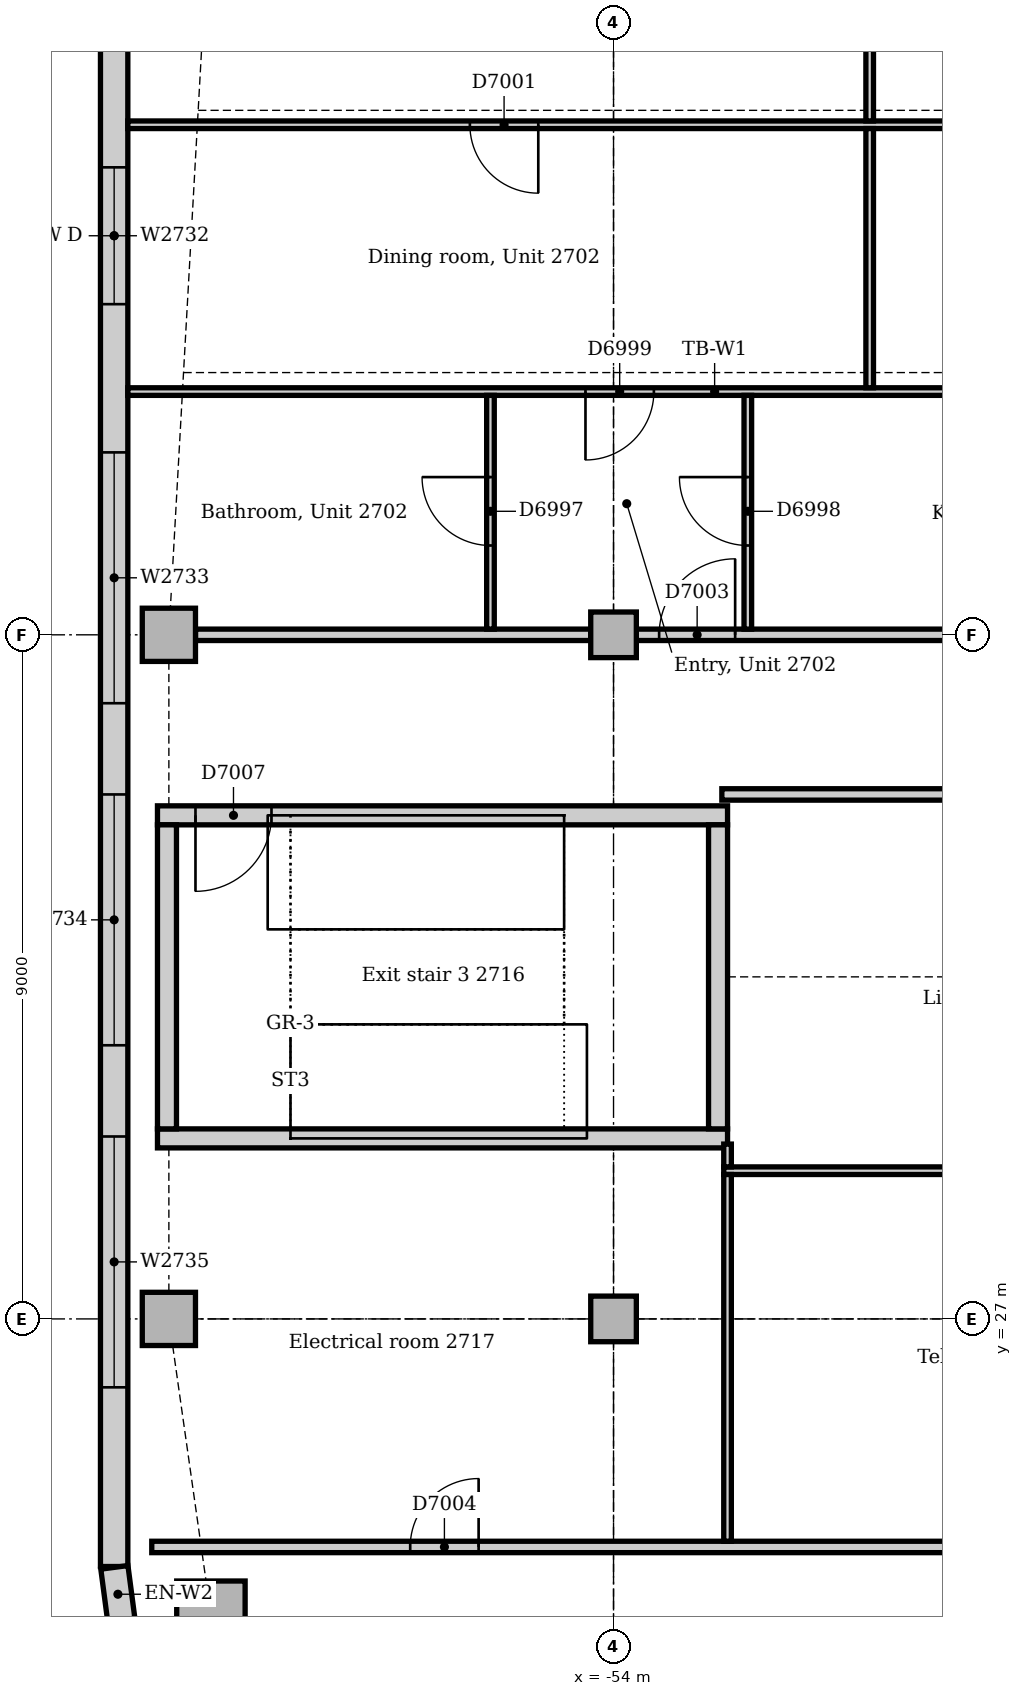
"""IFC4 building model, lengths in metres.
Left out: names, types, materials, properties, quantities, classifications, styles, units other than length and angle.
Written with IfcOpenShell. Run it as: python <this file> out.ifc"""

import sys

from ifc_helpers import new_model, si_unit, direction, frame, frame_2d, origin, origin_2d, place, context, subcontext, project, spatial, rectangle, extrude, element, fill, save


model = new_model("IFC4")
c1 = context("Model", 3, precision=1e-05, world=origin(), true_north=direction((0.0, 1.0)))
c2 = subcontext(c1, "Body", "Model", "MODEL_VIEW")
j1 = project(units=[si_unit("LENGTHUNIT", "METRE"), si_unit("PLANEANGLEUNIT", "RADIAN")], contexts=[c1])
p1 = place(None, origin())
s1 = spatial("IfcSite", under=j1, at=p1, CompositionType="ELEMENT")
p2 = place(p1, origin())
s2 = spatial("IfcBuilding", under=s1, at=p2, CompositionType="ELEMENT")
p3 = place(p2, frame((0.0, 0.0, 116.0)))
s3 = spatial("IfcBuildingStorey", under=s2, at=p3, CompositionType="ELEMENT", Elevation=116.0)
p4 = place(p3, frame((-60.0, 29.375, 0.0), z_axis=(0.0, 0.0, 1.0), x_axis=(1.0, 0.0, 0.0)))
e1 = element("IfcWall", 1, at=p4, inside=s3, PredefinedType="SOLIDWALL", context=c2, shape_type="SweptSolid", body=[
    extrude(rectangle(XDim=7.5, YDim=0.25, at=frame_2d((3.75, 0.0))), origin(), (0.0, 0.0, 1.0), 4.0),
])
p5 = place(p3, frame((-52.5, 33.625, 0.0), z_axis=(0.0, 0.0, 1.0), x_axis=(-1.0, 0.0, 0.0)))
e2 = element("IfcWall", 2, at=p5, inside=s3, PredefinedType="SOLIDWALL", context=c2, shape_type="SweptSolid", body=[
    extrude(rectangle(XDim=7.5, YDim=0.25, at=frame_2d((3.75, 0.0))), origin(), (0.0, 0.0, 1.0), 4.0),
])
p6 = place(p5, frame((6.0, 0.0, 0.0)))
e3 = element("IfcOpeningElement", 3, at=p6, cuts=e2, PredefinedType="OPENING", context=c2, shape_type="SweptSolid", body=[
    extrude(rectangle(XDim=1.0, YDim=2.1, at=frame_2d((0.5, 1.05))), frame((0.0, 0.135, 0.0), z_axis=(0.0, -1.0, 0.0), x_axis=(1.0, 0.0, 0.0)), (0.0, 0.0, 1.0), 0.27),
])
for number, where, z_axis, x_axis in (
    (4, (-52.625, 29.5, 0.0), (0.0, 0.0, 1.0), (0.0, 1.0, 0.0)),
    (5, (-59.875, 33.5, 0.0), (0.0, 0.0, 1.0), (0.0, -1.0, 0.0)),
):
    element("IfcWall", number, at=place(p3, frame(where, z_axis=z_axis, x_axis=x_axis)), inside=s3, PredefinedType="SOLIDWALL", context=c2, shape_type="SweptSolid", body=[
        extrude(rectangle(XDim=4.0, YDim=0.25, at=frame_2d((2.0, 0.0))), origin(), (0.0, 0.0, 1.0), 4.0),
    ])
p7 = place(p3, frame((-59.297, 23.102, 0.0), z_axis=(0.0, 0.0, 1.0), x_axis=(1.0, 0.0, 0.0)))
e6 = element("IfcColumn", 6, at=p7, inside=s3, PredefinedType="COLUMN", context=c2, shape_type="SweptSolid", body=[
    extrude(rectangle(XDim=0.9, YDim=0.9, at=origin_2d()), origin(), (0.0, 0.0, 1.0), 3.85),
])
for number, where, z_axis, x_axis in (
    (7, (-59.85, 27.0, 0.0), (0.0, 0.0, 1.0), (1.0, 0.0, 0.0)),
    (8, (-59.85, 36.0, 0.0), (0.0, 0.0, 1.0), (1.0, 0.0, 0.0)),
):
    element("IfcColumn", number, at=place(p3, frame(where, z_axis=z_axis, x_axis=x_axis)), inside=s3, PredefinedType="COLUMN", context=c2, shape_type="SweptSolid", body=[
        extrude(rectangle(XDim=0.7, YDim=0.7, at=origin_2d()), origin(), (0.0, 0.0, 1.0), 3.85),
    ])
for number, where, z_axis, x_axis in (
    (9, (-54.0, 27.0, 0.0), (0.0, 0.0, 1.0), (1.0, 0.0, 0.0)),
    (10, (-54.0, 36.0, 0.0), (0.0, 0.0, 1.0), (1.0, 0.0, 0.0)),
):
    element("IfcColumn", number, at=place(p3, frame(where, z_axis=z_axis, x_axis=x_axis)), inside=s3, PredefinedType="COLUMN", context=c2, shape_type="SweptSolid", body=[
        extrude(rectangle(XDim=0.6, YDim=0.6, at=origin_2d()), origin(), (0.0, 0.0, 1.0), 3.85),
    ])
p8 = place(p3, frame((-60.57, 45.257, 0.0), z_axis=(0.0, 0.0, 1.0), x_axis=(0.0, -1.0, 0.0)))
e11 = element("IfcWall", 11, at=p8, inside=s3, PredefinedType="STANDARD", context=c2, shape_type="SweptSolid", body=[
    extrude(rectangle(XDim=21.515, YDim=0.36, at=frame_2d((10.757, 0.0))), origin(), (0.0, 0.0, 1.0), 3.85),
])
p9 = place(p8, frame((3.107, 0.0, 0.9)))
e12 = element("IfcOpeningElement", 12, at=p9, cuts=e11, PredefinedType="OPENING", context=c2, shape_type="SweptSolid", body=[
    extrude(rectangle(XDim=1.8, YDim=1.6, at=frame_2d((0.9, 0.8))), frame((0.0, 0.19, 0.0), z_axis=(0.0, -1.0, 0.0), x_axis=(1.0, 0.0, 0.0)), (0.0, 0.0, 1.0), 0.38),
])
p10 = place(p8, frame((6.857, 0.0, 0.9)))
e13 = element("IfcOpeningElement", 13, at=p10, cuts=e11, PredefinedType="OPENING", context=c2, shape_type="SweptSolid", body=[
    extrude(rectangle(XDim=3.3, YDim=1.6, at=frame_2d((1.65, 0.8))), frame((0.0, 0.19, 0.0), z_axis=(0.0, -1.0, 0.0), x_axis=(1.0, 0.0, 0.0)), (0.0, 0.0, 1.0), 0.38),
])
p11 = place(p8, frame((11.357, 0.0, 0.9)))
e14 = element("IfcOpeningElement", 14, at=p11, cuts=e11, PredefinedType="OPENING", context=c2, shape_type="SweptSolid", body=[
    extrude(rectangle(XDim=3.3, YDim=1.6, at=frame_2d((1.65, 0.8))), frame((0.0, 0.19, 0.0), z_axis=(0.0, -1.0, 0.0), x_axis=(1.0, 0.0, 0.0)), (0.0, 0.0, 1.0), 0.38),
])
p12 = place(p8, frame((15.857, 0.0, 0.9)))
e15 = element("IfcOpeningElement", 15, at=p12, cuts=e11, PredefinedType="OPENING", context=c2, shape_type="SweptSolid", body=[
    extrude(rectangle(XDim=3.3, YDim=1.6, at=frame_2d((1.65, 0.8))), frame((0.0, 0.19, 0.0), z_axis=(0.0, -1.0, 0.0), x_axis=(1.0, 0.0, 0.0)), (0.0, 0.0, 1.0), 0.38),
])
p13 = place(p3, frame((-60.567, 23.731, 0.0), z_axis=(0.0, 0.0, 1.0), x_axis=(0.13055608231, -0.99144092581, 0.0)))
e16 = element("IfcWall", 16, at=p13, inside=s3, PredefinedType="STANDARD", context=c2, shape_type="SweptSolid", body=[
    extrude(rectangle(XDim=0.713, YDim=0.36, at=frame_2d((0.356, 0.0))), origin(), (0.0, 0.0, 1.0), 3.85),
])
p14 = place(p3, frame((-53.7, 36.0, 0.0), z_axis=(0.0, 0.0, 1.0), x_axis=(1.0, 0.0, 0.0)))
e17 = element("IfcWall", 17, at=p14, inside=s3, PredefinedType="PARTITIONING", context=c2, shape_type="SweptSolid", body=[
    extrude(rectangle(XDim=8.4, YDim=0.15, at=frame_2d((4.2, 0.0))), origin(), (0.0, 0.0, 1.0), 3.262),
])
p15 = place(p14, frame((0.3, 0.0, 0.0)))
e18 = element("IfcOpeningElement", 18, at=p15, cuts=e17, PredefinedType="OPENING", context=c2, shape_type="SweptSolid", body=[
    extrude(rectangle(XDim=1.0, YDim=2.1, at=frame_2d((0.5, 1.05))), frame((0.0, 0.085, 0.0), z_axis=(0.0, -1.0, 0.0), x_axis=(1.0, 0.0, 0.0)), (0.0, 0.0, 1.0), 0.17),
])
p16 = place(p3, frame((-59.5, 36.0, 0.0), z_axis=(0.0, 0.0, 1.0), x_axis=(1.0, 0.0, 0.0)))
e19 = element("IfcWall", 19, at=p16, inside=s3, PredefinedType="PARTITIONING", context=c2, shape_type="SweptSolid", body=[
    extrude(rectangle(XDim=5.2, YDim=0.15, at=frame_2d((2.6, 0.0))), origin(), (0.0, 0.0, 1.0), 3.35),
])
p17 = place(p3, frame((-60.075, 24.0, 0.0), z_axis=(0.0, 0.0, 1.0), x_axis=(1.0, 0.0, 0.0)))
e20 = element("IfcWall", 20, at=p17, inside=s3, PredefinedType="PARTITIONING", context=c2, shape_type="SweptSolid", body=[
    extrude(rectangle(XDim=15.15, YDim=0.15, at=frame_2d((7.575, 0.0))), origin(), (0.0, 0.0, 1.0), 3.85),
])
p18 = place(p17, frame((3.4, 0.0, 0.0)))
e21 = element("IfcOpeningElement", 21, at=p18, cuts=e20, PredefinedType="OPENING", context=c2, shape_type="SweptSolid", body=[
    extrude(rectangle(XDim=0.9, YDim=2.1, at=frame_2d((0.45, 1.05))), frame((0.0, 0.085, 0.0), z_axis=(0.0, -1.0, 0.0), x_axis=(1.0, 0.0, 0.0)), (0.0, 0.0, 1.0), 0.17),
])
p19 = place(p3, frame((-52.575, 33.9, 0.0), z_axis=(0.0, 0.0, 1.0), x_axis=(1.0, 0.0, 0.0)))
e22 = element("IfcWall", 22, at=p19, inside=s3, PredefinedType="PARTITIONING", context=c2, shape_type="SweptSolid", body=[
    extrude(rectangle(XDim=7.5, YDim=0.15, at=frame_2d((3.75, 0.0))), origin(), (0.0, 0.0, 1.0), 3.85),
])
p20 = place(p19, frame((3.3, 0.0, 0.0)))
e23 = element("IfcOpeningElement", 23, at=p20, cuts=e22, PredefinedType="OPENING", context=c2, shape_type="SweptSolid", body=[
    extrude(rectangle(XDim=0.9, YDim=2.1, at=frame_2d((0.45, 1.05))), frame((0.0, 0.085, 0.0), z_axis=(0.0, -1.0, 0.0), x_axis=(1.0, 0.0, 0.0)), (0.0, 0.0, 1.0), 0.17),
])
p21 = place(p3, frame((-60.39, 39.2, 0.0), z_axis=(0.0, 0.0, 1.0), x_axis=(1.0, 0.0, 0.0)))
e24 = element("IfcWall", 24, at=p21, inside=s3, PredefinedType="PARTITIONING", context=c2, shape_type="SweptSolid", body=[
    extrude(rectangle(XDim=15.44, YDim=0.1, at=frame_2d((7.72, 0.0))), origin(), (0.0, 0.0, 1.0), 3.85),
])
p22 = place(p21, frame((6.021, 0.0, 0.0)))
e25 = element("IfcOpeningElement", 25, at=p22, cuts=e24, PredefinedType="OPENING", context=c2, shape_type="SweptSolid", body=[
    extrude(rectangle(XDim=0.9, YDim=2.1, at=frame_2d((0.45, 1.05))), frame((0.0, 0.06, 0.0), z_axis=(0.0, -1.0, 0.0), x_axis=(1.0, 0.0, 0.0)), (0.0, 0.0, 1.0), 0.12),
])
p23 = place(p3, frame((-60.39, 42.71, 0.0), z_axis=(0.0, 0.0, 1.0), x_axis=(1.0, 0.0, 0.0)))
e26 = element("IfcWall", 26, at=p23, inside=s3, PredefinedType="PARTITIONING", context=c2, shape_type="SweptSolid", body=[
    extrude(rectangle(XDim=15.44, YDim=0.1, at=frame_2d((7.72, 0.0))), origin(), (0.0, 0.0, 1.0), 3.85),
])
p24 = place(p23, frame((4.5, 0.0, 0.0)))
e27 = element("IfcOpeningElement", 27, at=p24, cuts=e26, PredefinedType="OPENING", context=c2, shape_type="SweptSolid", body=[
    extrude(rectangle(XDim=0.9, YDim=2.1, at=frame_2d((0.45, 1.05))), frame((0.0, 0.06, 0.0), z_axis=(0.0, -1.0, 0.0), x_axis=(1.0, 0.0, 0.0)), (0.0, 0.0, 1.0), 0.12),
])
p25 = place(p23, frame((12.06, 0.0, 0.0)))
e28 = element("IfcOpeningElement", 28, at=p25, cuts=e26, PredefinedType="OPENING", context=c2, shape_type="SweptSolid", body=[
    extrude(rectangle(XDim=0.9, YDim=2.1, at=frame_2d((0.45, 1.05))), frame((0.0, 0.06, 0.0), z_axis=(0.0, -1.0, 0.0), x_axis=(1.0, 0.0, 0.0)), (0.0, 0.0, 1.0), 0.12),
])
p26 = place(p3, frame((-50.63, 39.25, 0.0), z_axis=(0.0, 0.0, 1.0), x_axis=(0.0, 1.0, 0.0)))
e29 = element("IfcWall", 29, at=p26, inside=s3, PredefinedType="PARTITIONING", context=c2, shape_type="SweptSolid", body=[
    extrude(rectangle(XDim=3.41, YDim=0.1, at=frame_2d((1.705, 0.0))), origin(), (0.0, 0.0, 1.0), 3.85),
])
p27 = place(p3, frame((-50.63, 42.76, 0.0), z_axis=(0.0, 0.0, 1.0), x_axis=(0.0, 1.0, 0.0)))
e30 = element("IfcWall", 30, at=p27, inside=s3, PredefinedType="PARTITIONING", context=c2, shape_type="SweptSolid", body=[
    extrude(rectangle(XDim=6.38, YDim=0.1, at=frame_2d((3.19, 0.0))), origin(), (0.0, 0.0, 1.0), 3.85),
])
p28 = place(p27, frame((2.75, 0.0, 0.0)))
e31 = element("IfcOpeningElement", 31, at=p28, cuts=e30, PredefinedType="OPENING", context=c2, shape_type="SweptSolid", body=[
    extrude(rectangle(XDim=0.9, YDim=2.1, at=frame_2d((0.45, 1.05))), frame((0.0, 0.06, 0.0), z_axis=(0.0, -1.0, 0.0), x_axis=(1.0, 0.0, 0.0)), (0.0, 0.0, 1.0), 0.12),
])
p29 = place(p3, frame((-52.55, 28.95, 0.0), z_axis=(0.0, 0.0, 1.0), x_axis=(1.0, 0.0, 0.0)))
e32 = element("IfcWall", 32, at=p29, inside=s3, PredefinedType="PARTITIONING", context=c2, shape_type="SweptSolid", body=[
    extrude(rectangle(XDim=7.475, YDim=0.1, at=frame_2d((3.737, 0.0))), origin(), (0.0, 0.0, 1.0), 3.85),
])
p30 = place(p3, frame((-52.5, 29.0, 0.0), z_axis=(0.0, 0.0, 1.0), x_axis=(0.0, 1.0, 0.0)))
e33 = element("IfcWall", 33, at=p30, inside=s3, PredefinedType="PARTITIONING", context=c2, shape_type="SweptSolid", body=[
    extrude(rectangle(XDim=0.3, YDim=0.1, at=frame_2d((0.15, 0.0))), origin(), (0.0, 0.0, 1.0), 3.85),
])
p31 = place(p3, frame((-52.5, 24.075, 0.0), z_axis=(0.0, 0.0, 1.0), x_axis=(0.0, 1.0, 0.0)))
e34 = element("IfcWall", 34, at=p31, inside=s3, PredefinedType="PARTITIONING", context=c2, shape_type="SweptSolid", body=[
    extrude(rectangle(XDim=4.825, YDim=0.1, at=frame_2d((2.413, 0.0))), origin(), (0.0, 0.0, 1.0), 3.85),
])
p32 = place(p3, frame((-55.619, 36.075, 0.0), z_axis=(0.0, 0.0, 1.0), x_axis=(0.0, 1.0, 0.0)))
e35 = element("IfcWall", 35, at=p32, inside=s3, PredefinedType="PARTITIONING", context=c2, shape_type="SweptSolid", body=[
    extrude(rectangle(XDim=3.075, YDim=0.1, at=frame_2d((1.538, 0.0))), origin(), (0.0, 0.0, 1.0), 3.85),
])
p33 = place(p32, frame((1.1, 0.0, 0.0)))
e36 = element("IfcOpeningElement", 36, at=p33, cuts=e35, PredefinedType="OPENING", context=c2, shape_type="SweptSolid", body=[
    extrude(rectangle(XDim=0.9, YDim=2.1, at=frame_2d((0.45, 1.05))), frame((0.0, 0.06, 0.0), z_axis=(0.0, -1.0, 0.0), x_axis=(1.0, 0.0, 0.0)), (0.0, 0.0, 1.0), 0.12),
])
p34 = place(p3, frame((-52.233, 36.075, 0.0), z_axis=(0.0, 0.0, 1.0), x_axis=(0.0, 1.0, 0.0)))
e37 = element("IfcWall", 37, at=p34, inside=s3, PredefinedType="PARTITIONING", context=c2, shape_type="SweptSolid", body=[
    extrude(rectangle(XDim=3.075, YDim=0.1, at=frame_2d((1.538, 0.0))), origin(), (0.0, 0.0, 1.0), 3.85),
])
p35 = place(p34, frame((1.1, 0.0, 0.0)))
e38 = element("IfcOpeningElement", 38, at=p35, cuts=e37, PredefinedType="OPENING", context=c2, shape_type="SweptSolid", body=[
    extrude(rectangle(XDim=0.9, YDim=2.1, at=frame_2d((0.45, 1.05))), frame((0.0, 0.06, 0.0), z_axis=(0.0, -1.0, 0.0), x_axis=(1.0, 0.0, 0.0)), (0.0, 0.0, 1.0), 0.12),
])
p36 = place(p9, origin())
e39 = element("IfcWindow", 39, at=p36, inside=s3, PartitioningType="SINGLE_PANEL", PredefinedType="WINDOW", context=c2, shape_type="SweptSolid", body=[
    extrude(rectangle(XDim=1.8, YDim=1.6, at=frame_2d((0.9, 0.8))), frame((0.0, 0.13, 0.0), z_axis=(0.0, -1.0, 0.0), x_axis=(1.0, 0.0, 0.0)), (0.0, 0.0, 1.0), 0.06),
])
fill(e12, e39)
p37 = place(p10, origin())
e40 = element("IfcWindow", 40, at=p37, inside=s3, PartitioningType="SINGLE_PANEL", PredefinedType="WINDOW", context=c2, shape_type="SweptSolid", body=[
    extrude(rectangle(XDim=3.3, YDim=1.6, at=frame_2d((1.65, 0.8))), frame((0.0, 0.13, 0.0), z_axis=(0.0, -1.0, 0.0), x_axis=(1.0, 0.0, 0.0)), (0.0, 0.0, 1.0), 0.06),
])
fill(e13, e40)
p38 = place(p11, origin())
e41 = element("IfcWindow", 41, at=p38, inside=s3, PartitioningType="SINGLE_PANEL", PredefinedType="WINDOW", context=c2, shape_type="SweptSolid", body=[
    extrude(rectangle(XDim=3.3, YDim=1.6, at=frame_2d((1.65, 0.8))), frame((0.0, 0.13, 0.0), z_axis=(0.0, -1.0, 0.0), x_axis=(1.0, 0.0, 0.0)), (0.0, 0.0, 1.0), 0.06),
])
fill(e14, e41)
p39 = place(p12, origin())
e42 = element("IfcWindow", 42, at=p39, inside=s3, PartitioningType="SINGLE_PANEL", PredefinedType="WINDOW", context=c2, shape_type="SweptSolid", body=[
    extrude(rectangle(XDim=3.3, YDim=1.6, at=frame_2d((1.65, 0.8))), frame((0.0, 0.13, 0.0), z_axis=(0.0, -1.0, 0.0), x_axis=(1.0, 0.0, 0.0)), (0.0, 0.0, 1.0), 0.06),
])
fill(e15, e42)
p40 = place(p33, origin())
e43 = element("IfcDoor", 43, at=p40, inside=s3, OperationType="SINGLE_SWING_RIGHT", PredefinedType="DOOR", context=c2, shape_type="SweptSolid", body=[
    extrude(rectangle(XDim=0.9, YDim=2.1, at=frame_2d((0.45, 1.05))), frame((0.0, 0.025, 0.0), z_axis=(0.0, -1.0, 0.0), x_axis=(1.0, 0.0, 0.0)), (0.0, 0.0, 1.0), 0.05),
])
fill(e36, e43)
p41 = place(p35, origin())
e44 = element("IfcDoor", 44, at=p41, inside=s3, OperationType="SINGLE_SWING_RIGHT", PredefinedType="DOOR", context=c2, shape_type="SweptSolid", body=[
    extrude(rectangle(XDim=0.9, YDim=2.1, at=frame_2d((0.45, 1.05))), frame((0.0, 0.025, 0.0), z_axis=(0.0, -1.0, 0.0), x_axis=(1.0, 0.0, 0.0)), (0.0, 0.0, 1.0), 0.05),
])
fill(e38, e44)
p42 = place(p22, frame((0.9, 0.0, 0.0), z_axis=(0.0, 0.0, 1.0), x_axis=(-1.0, 0.0, 0.0)))
e45 = element("IfcDoor", 45, at=p42, inside=s3, OperationType="SINGLE_SWING_RIGHT", PredefinedType="DOOR", context=c2, shape_type="SweptSolid", body=[
    extrude(rectangle(XDim=0.9, YDim=2.1, at=frame_2d((0.45, 1.05))), frame((0.0, 0.025, 0.0), z_axis=(0.0, -1.0, 0.0), x_axis=(1.0, 0.0, 0.0)), (0.0, 0.0, 1.0), 0.05),
])
fill(e25, e45)
p43 = place(p24, frame((0.9, 0.0, 0.0), z_axis=(0.0, 0.0, 1.0), x_axis=(-1.0, 0.0, 0.0)))
e46 = element("IfcDoor", 46, at=p43, inside=s3, OperationType="SINGLE_SWING_LEFT", PredefinedType="DOOR", context=c2, shape_type="SweptSolid", body=[
    extrude(rectangle(XDim=0.9, YDim=2.1, at=frame_2d((0.45, 1.05))), frame((0.0, 0.025, 0.0), z_axis=(0.0, -1.0, 0.0), x_axis=(1.0, 0.0, 0.0)), (0.0, 0.0, 1.0), 0.05),
])
fill(e27, e46)
p44 = place(p15, origin())
e47 = element("IfcDoor", 47, at=p44, inside=s3, OperationType="SINGLE_SWING_RIGHT", PredefinedType="DOOR", context=c2, shape_type="SweptSolid", body=[
    extrude(rectangle(XDim=1.0, YDim=2.1, at=frame_2d((0.5, 1.05))), frame((0.0, 0.025, 0.0), z_axis=(0.0, -1.0, 0.0), x_axis=(1.0, 0.0, 0.0)), (0.0, 0.0, 1.0), 0.05),
])
fill(e18, e47)
p45 = place(p18, origin())
e48 = element("IfcDoor", 48, at=p45, inside=s3, OperationType="SINGLE_SWING_RIGHT", PredefinedType="DOOR", context=c2, shape_type="SweptSolid", body=[
    extrude(rectangle(XDim=0.9, YDim=2.1, at=frame_2d((0.45, 1.05))), frame((0.0, 0.025, 0.0), z_axis=(0.0, -1.0, 0.0), x_axis=(1.0, 0.0, 0.0)), (0.0, 0.0, 1.0), 0.05),
])
fill(e21, e48)
p46 = place(p6, origin())
e49 = element("IfcDoor", 49, at=p46, inside=s3, OperationType="SINGLE_SWING_RIGHT", PredefinedType="DOOR", context=c2, shape_type="SweptSolid", body=[
    extrude(rectangle(XDim=1.0, YDim=2.1, at=frame_2d((0.5, 1.05))), frame((0.0, 0.025, 0.0), z_axis=(0.0, -1.0, 0.0), x_axis=(1.0, 0.0, 0.0)), (0.0, 0.0, 1.0), 0.05),
])
fill(e3, e49)
save(model, sys.argv[1])
